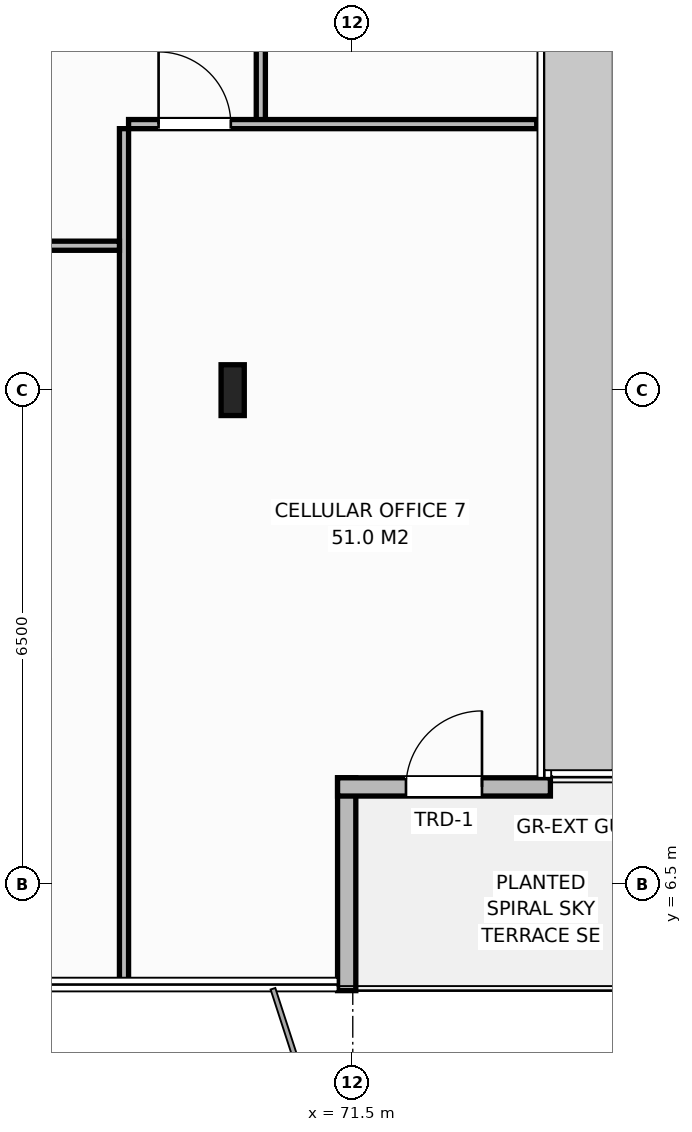
"""IFC4 building model, lengths in metres.
Left out: names, types, materials, properties, quantities, classifications, styles, units other than length and angle.
Written with IfcOpenShell. Run it as: python <this file> out.ifc"""

import sys

from ifc_helpers import new_model, si_unit, direction, frame, frame_2d, origin, origin_2d, place, context, subcontext, project, spatial, rectangle, i_section, extrude, element, fill, save


model = new_model("IFC4")
c1 = context("Model", 3, precision=1e-05, world=origin(), true_north=direction((0.0, 1.0)))
c2 = subcontext(c1, "Body", "Model", "MODEL_VIEW")
j1 = project(units=[si_unit("LENGTHUNIT", "METRE"), si_unit("PLANEANGLEUNIT", "RADIAN")], contexts=[c1])
p1 = place(None, origin())
s1 = spatial("IfcSite", under=j1, at=p1, CompositionType="ELEMENT")
p2 = place(p1, origin())
s2 = spatial("IfcBuilding", under=s1, at=p2, CompositionType="ELEMENT")
p3 = place(p2, frame((0.0, 0.0, 306.4)))
s3 = spatial("IfcBuildingStorey", under=s2, at=p3, CompositionType="ELEMENT", Elevation=306.4)
p4 = place(p3, frame((69.92, 13.0, 0.0), z_axis=(0.0, 0.0, 1.0), x_axis=(1.0, 0.0, 0.0)))
e1 = element("IfcColumn", 1, at=p4, inside=s3, PredefinedType="COLUMN", context=c2, shape_type="SweptSolid", body=[
    extrude(i_section(OverallWidth=0.305, OverallDepth=0.668, WebThickness=0.021, FlangeThickness=0.04, at=origin_2d()), origin(), (0.0, 0.0, 1.0), 4.0),
])
p5 = place(p3, frame((71.42, 7.9, 0.0), z_axis=(0.0, 0.0, 1.0), x_axis=(0.0, -1.0, 0.0)))
e2 = element("IfcWall", 2, at=p5, inside=s3, PredefinedType="STANDARD", context=c2, shape_type="SweptSolid", body=[
    extrude(rectangle(XDim=2.8, YDim=0.24, at=frame_2d((1.4, 0.0))), origin(), (0.0, 0.0, 1.0), 3.72),
])
p6 = place(p3, frame((74.1, 7.78, 0.0), z_axis=(0.0, 0.0, 1.0), x_axis=(-1.0, 0.0, 0.0)))
e3 = element("IfcWall", 3, at=p6, inside=s3, PredefinedType="STANDARD", context=c2, shape_type="SweptSolid", body=[
    extrude(rectangle(XDim=2.8, YDim=0.24, at=frame_2d((1.4, 0.0))), origin(), (0.0, 0.0, 1.0), 3.72),
])
p7 = place(p6, frame((0.9, 0.0, 0.0)))
e4 = element("IfcOpeningElement", 4, at=p7, cuts=e3, PredefinedType="OPENING", context=c2, shape_type="SweptSolid", body=[
    extrude(rectangle(XDim=1.0, YDim=2.2, at=frame_2d((0.5, 1.1))), frame((0.0, 0.13, 0.0), z_axis=(0.0, -1.0, 0.0), x_axis=(1.0, 0.0, 0.0)), (0.0, 0.0, 1.0), 0.26),
])
p8 = place(p3, frame((70.29, 16.5, 0.0), z_axis=(0.0, 0.0, 1.0), x_axis=(0.0, 1.0, 0.0)))
e5 = element("IfcWall", 5, at=p8, inside=s3, PredefinedType="PARTITIONING", context=c2, shape_type="SweptSolid", body=[
    extrude(rectangle(XDim=2.1, YDim=0.12, at=frame_2d((1.05, 0.0))), origin(), (0.0, 0.0, 1.0), 3.72),
])
p9 = place(p3, frame((68.49, 5.12, 0.0), z_axis=(0.0, 0.0, 1.0), x_axis=(0.0, 1.0, 0.0)))
e6 = element("IfcWall", 6, at=p9, inside=s3, PredefinedType="PARTITIONING", context=c2, shape_type="SweptSolid", body=[
    extrude(rectangle(XDim=11.32, YDim=0.12, at=frame_2d((5.66, 0.0))), origin(), (0.0, 0.0, 1.0), 3.72),
])
p10 = place(p3, frame((65.303, 14.9, 0.0), z_axis=(0.0, 0.0, 1.0), x_axis=(1.0, 0.0, 0.0)))
e7 = element("IfcWall", 7, at=p10, inside=s3, PredefinedType="PARTITIONING", context=c2, shape_type="SweptSolid", body=[
    extrude(rectangle(XDim=3.127, YDim=0.12, at=frame_2d((1.563, 0.0))), origin(), (0.0, 0.0, 1.0), 3.72),
])
p11 = place(p10, frame((0.938, 0.0, 0.0)))
e8 = element("IfcOpeningElement", 8, at=p11, cuts=e7, PredefinedType="OPENING", context=c2, shape_type="SweptSolid", body=[
    extrude(rectangle(XDim=0.95, YDim=2.15, at=frame_2d((0.475, 1.075))), frame((0.0, 0.07, 0.0), z_axis=(0.0, -1.0, 0.0), x_axis=(1.0, 0.0, 0.0)), (0.0, 0.0, 1.0), 0.14),
])
p12 = place(p3, frame((68.55, 16.5, 0.0), z_axis=(0.0, 0.0, 1.0), x_axis=(1.0, 0.0, 0.0)))
e9 = element("IfcWall", 9, at=p12, inside=s3, PredefinedType="PARTITIONING", context=c2, shape_type="SweptSolid", body=[
    extrude(rectangle(XDim=5.37, YDim=0.12, at=frame_2d((2.685, 0.0))), origin(), (0.0, 0.0, 1.0), 3.72),
])
p13 = place(p12, frame((0.395, 0.0, 0.0)))
e10 = element("IfcOpeningElement", 10, at=p13, cuts=e9, PredefinedType="OPENING", context=c2, shape_type="SweptSolid", body=[
    extrude(rectangle(XDim=0.95, YDim=2.15, at=frame_2d((0.475, 1.075))), frame((0.0, 0.07, 0.0), z_axis=(0.0, -1.0, 0.0), x_axis=(1.0, 0.0, 0.0)), (0.0, 0.0, 1.0), 0.14),
])
p14 = place(p7, origin())
e11 = element("IfcDoor", 11, at=p14, inside=s3, OperationType="SINGLE_SWING_RIGHT", PredefinedType="DOOR", context=c2, shape_type="SweptSolid", body=[
    extrude(rectangle(XDim=1.0, YDim=2.2, at=frame_2d((0.5, 1.1))), frame((0.0, 0.025, 0.0), z_axis=(0.0, -1.0, 0.0), x_axis=(1.0, 0.0, 0.0)), (0.0, 0.0, 1.0), 0.05),
])
fill(e4, e11)
p15 = place(p13, origin())
e12 = element("IfcDoor", 12, at=p15, inside=s3, OperationType="SINGLE_SWING_LEFT", PredefinedType="DOOR", context=c2, shape_type="SweptSolid", body=[
    extrude(rectangle(XDim=0.95, YDim=2.15, at=frame_2d((0.475, 1.075))), frame((0.0, 0.025, 0.0), z_axis=(0.0, -1.0, 0.0), x_axis=(1.0, 0.0, 0.0)), (0.0, 0.0, 1.0), 0.05),
])
fill(e10, e12)
save(model, sys.argv[1])
